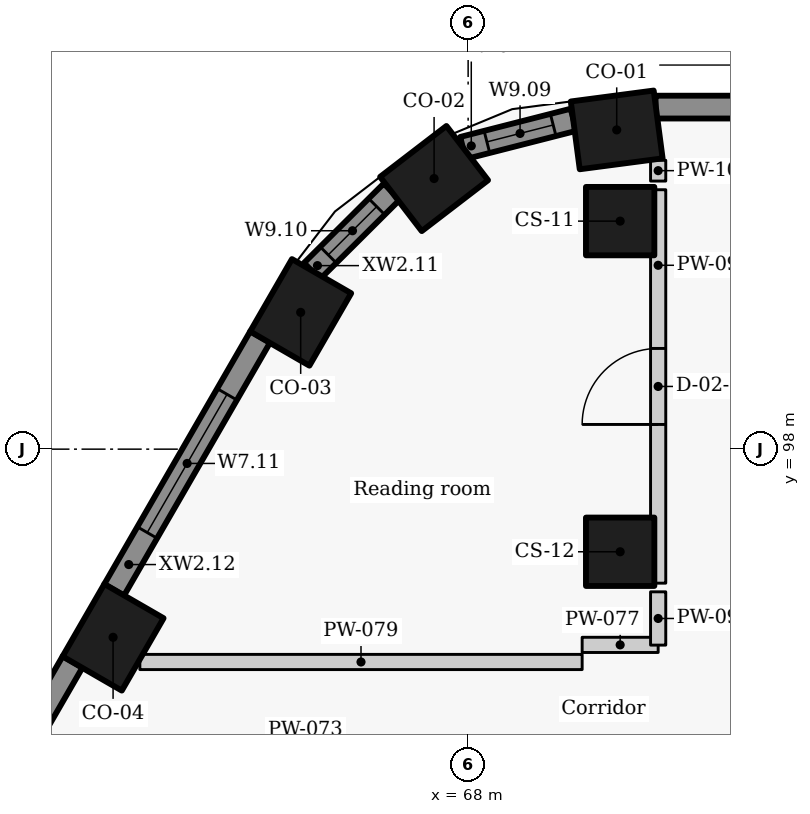
"""IFC4 building model, lengths in metres.
Left out: names, types, materials, properties, quantities, classifications, styles, units other than length and angle.
Written with IfcOpenShell. Run it as: python <this file> out.ifc"""

import sys

from ifc_helpers import new_model, si_unit, direction, frame, frame_2d, origin, origin_2d, place, context, subcontext, project, spatial, rectangle, extrude, element, fill, save


model = new_model("IFC4")
c1 = context("Model", 3, precision=1e-05, world=origin(), true_north=direction((0.0, 1.0)))
c2 = subcontext(c1, "Body", "Model", "MODEL_VIEW")
j1 = project(units=[si_unit("LENGTHUNIT", "METRE"), si_unit("PLANEANGLEUNIT", "RADIAN")], contexts=[c1])
p1 = place(None, origin())
s1 = spatial("IfcSite", under=j1, at=p1, CompositionType="ELEMENT")
p2 = place(p1, origin())
s2 = spatial("IfcBuilding", under=s1, at=p2, CompositionType="ELEMENT")
p3 = place(p2, frame((0.0, 0.0, 239.4)))
s3 = spatial("IfcBuildingStorey", under=s2, at=p3, CompositionType="ELEMENT", Elevation=239.4)
for number, where, z_axis, x_axis in (
    (1, (69.955, 102.2, 0.0), (0.0, 0.0, 1.0), (-0.991, -0.131, 0.0)),
    (2, (67.552, 101.56, 0.0), (0.0, 0.0, 1.0), (-0.793, -0.609, 0.0)),
    (3, (65.797, 99.8, 0.0), (0.0, 0.0, 1.0), (-0.5, -0.866, 0.0)),
    (4, (63.329, 95.525, 0.0), (0.0, 0.0, 1.0), (-0.5, -0.866, 0.0)),
):
    element("IfcColumn", number, at=place(p3, frame(where, z_axis=z_axis, x_axis=x_axis)), inside=s3, PredefinedType="COLUMN", context=c2, shape_type="SweptSolid", body=[
        extrude(rectangle(XDim=1.1, YDim=0.9, at=origin_2d()), origin(), (0.0, 0.0, 1.0), 3.3),
    ])
for number, where, z_axis, x_axis in (
    (5, (70.0, 101.0, 0.0), (0.0, 0.0, 1.0), (0.0, -1.0, 0.0)),
    (6, (70.0, 96.65, 0.0), (0.0, 0.0, 1.0), (0.0, -1.0, 0.0)),
):
    element("IfcColumn", number, at=place(p3, frame(where, z_axis=z_axis, x_axis=x_axis)), inside=s3, PredefinedType="COLUMN", context=c2, shape_type="SweptSolid", body=[
        extrude(rectangle(XDim=0.9, YDim=0.9, at=origin_2d()), origin(), (0.0, 0.0, 1.0), 3.3),
    ])
p4 = place(p3, frame((89.499, 102.5, 0.0), z_axis=(0.0, 0.0, 1.0), x_axis=(-1.0, 0.0, 0.0)))
e7 = element("IfcWall", 7, at=p4, inside=s3, PredefinedType="SOLIDWALL", context=c2, shape_type="SweptSolid", body=[
    extrude(rectangle(XDim=19.033, YDim=0.3, at=frame_2d((9.517, 0.0))), origin(), (0.0, 0.0, 1.0), 2.425),
])
p5 = place(p3, frame((69.386, 102.333, 0.0), z_axis=(0.0, 0.0, 1.0), x_axis=(-0.968895303033, -0.247470991757, 0.0)))
e8 = element("IfcWall", 8, at=p5, inside=s3, PredefinedType="SOLIDWALL", context=c2, shape_type="SweptSolid", body=[
    extrude(rectangle(XDim=1.5, YDim=0.3, at=frame_2d((0.75, 0.0))), origin(), (0.0, 0.0, 1.0), 2.425),
])
p6 = place(p5, frame((0.276, 0.0, 0.9)))
e9 = element("IfcOpeningElement", 9, at=p6, cuts=e8, PredefinedType="OPENING", context=c2, shape_type="SweptSolid", body=[
    extrude(rectangle(XDim=0.9, YDim=1.1, at=frame_2d((0.45, 0.55))), frame((0.0, 0.16, 0.0), z_axis=(0.0, -1.0, 0.0), x_axis=(1.0, 0.0, 0.0)), (0.0, 0.0, 1.0), 0.32),
])
p7 = place(p3, frame((66.996, 101.388, 0.0), z_axis=(0.0, 0.0, 1.0), x_axis=(-0.708589353117, -0.705621094249, 0.0)))
e10 = element("IfcWall", 10, at=p7, inside=s3, PredefinedType="SOLIDWALL", context=c2, shape_type="SweptSolid", body=[
    extrude(rectangle(XDim=1.48, YDim=0.3, at=frame_2d((0.74, 0.0))), origin(), (0.0, 0.0, 1.0), 2.425),
])
p8 = place(p7, frame((0.28, 0.0, 0.9)))
e11 = element("IfcOpeningElement", 11, at=p8, cuts=e10, PredefinedType="OPENING", context=c2, shape_type="SweptSolid", body=[
    extrude(rectangle(XDim=0.9, YDim=1.1, at=frame_2d((0.45, 0.55))), frame((0.0, 0.16, 0.0), z_axis=(0.0, -1.0, 0.0), x_axis=(1.0, 0.0, 0.0)), (0.0, 0.0, 1.0), 0.32),
])
p9 = place(p3, frame((65.264, 99.477, 0.0), z_axis=(0.0, 0.0, 1.0), x_axis=(-0.499984490703, -0.866034357896, 0.0)))
e12 = element("IfcWall", 12, at=p9, inside=s3, PredefinedType="SOLIDWALL", context=c2, shape_type="SweptSolid", body=[
    extrude(rectangle(XDim=3.844, YDim=0.3, at=frame_2d((1.922, 0.0))), origin(), (0.0, 0.0, 1.0), 2.425),
])
p10 = place(p9, frame((0.872, 0.0, 0.9)))
e13 = element("IfcOpeningElement", 13, at=p10, cuts=e12, PredefinedType="OPENING", context=c2, shape_type="SweptSolid", body=[
    extrude(rectangle(XDim=2.1, YDim=1.1, at=frame_2d((1.05, 0.55))), frame((0.0, 0.16, 0.0), z_axis=(0.0, -1.0, 0.0), x_axis=(1.0, 0.0, 0.0)), (0.0, 0.0, 1.0), 0.32),
])
p11 = place(p3, frame((62.796, 95.202, 0.0), z_axis=(0.0, 0.0, 1.0), x_axis=(-0.499984490703, -0.866034357896, 0.0)))
e14 = element("IfcWall", 14, at=p11, inside=s3, PredefinedType="SOLIDWALL", context=c2, shape_type="SweptSolid", body=[
    extrude(rectangle(XDim=3.844, YDim=0.3, at=frame_2d((1.922, 0.0))), origin(), (0.0, 0.0, 1.0), 2.425),
])
p12 = place(p11, frame((1.863, 0.0, 0.9)))
e15 = element("IfcOpeningElement", 15, at=p12, cuts=e14, PredefinedType="OPENING", context=c2, shape_type="SweptSolid", body=[
    extrude(rectangle(XDim=1.5, YDim=1.1, at=frame_2d((0.75, 0.55))), frame((0.0, 0.16, 0.0), z_axis=(0.0, -1.0, 0.0), x_axis=(1.0, 0.0, 0.0)), (0.0, 0.0, 1.0), 0.32),
])
p13 = place(p3, frame((69.5, 95.425, 0.0), z_axis=(0.0, 0.0, 1.0), x_axis=(1.0, 0.0, 0.0)))
e16 = element("IfcWall", 16, at=p13, inside=s3, PredefinedType="PARTITIONING", context=c2, shape_type="SweptSolid", body=[
    extrude(rectangle(XDim=1.0, YDim=0.2, at=frame_2d((0.5, 0.0))), origin(), (0.0, 0.0, 1.0), 2.505),
])
p14 = place(p3, frame((63.681, 95.2, 0.0), z_axis=(0.0, 0.0, 1.0), x_axis=(1.0, 0.0, 0.0)))
e17 = element("IfcWall", 17, at=p14, inside=s3, PredefinedType="PARTITIONING", context=c2, shape_type="SweptSolid", body=[
    extrude(rectangle(XDim=5.819, YDim=0.2, at=frame_2d((2.909, 0.0))), origin(), (0.0, 0.0, 1.0), 3.025),
])
p15 = place(p3, frame((70.5, 95.422, 0.0), z_axis=(0.0, 0.0, 1.0), x_axis=(0.0, 1.0, 0.0)))
e18 = element("IfcWall", 18, at=p15, inside=s3, PredefinedType="PARTITIONING", context=c2, shape_type="SweptSolid", body=[
    extrude(rectangle(XDim=0.701, YDim=0.2, at=frame_2d((0.351, 0.0))), origin(), (0.0, 0.0, 1.0), 3.025),
])
p16 = place(p3, frame((70.5, 96.237, 0.0), z_axis=(0.0, 0.0, 1.0), x_axis=(0.0, 1.0, 0.0)))
e19 = element("IfcWall", 19, at=p16, inside=s3, PredefinedType="PARTITIONING", context=c2, shape_type="SweptSolid", body=[
    extrude(rectangle(XDim=5.176, YDim=0.2, at=frame_2d((2.588, 0.0))), origin(), (0.0, 0.0, 1.0), 3.025),
])
p17 = place(p16, frame((2.088, 0.0, 0.0)))
e20 = element("IfcOpeningElement", 20, at=p17, cuts=e19, PredefinedType="OPENING", context=c2, shape_type="SweptSolid", body=[
    extrude(rectangle(XDim=1.0, YDim=2.1, at=frame_2d((0.5, 1.05))), frame((0.0, 0.11, 0.0), z_axis=(0.0, -1.0, 0.0), x_axis=(1.0, 0.0, 0.0)), (0.0, 0.0, 1.0), 0.22),
])
p18 = place(p3, frame((70.5, 101.527, 0.0), z_axis=(0.0, 0.0, 1.0), x_axis=(0.0, 1.0, 0.0)))
e21 = element("IfcWall", 21, at=p18, inside=s3, PredefinedType="PARTITIONING", context=c2, shape_type="SweptSolid", body=[
    extrude(rectangle(XDim=0.274, YDim=0.2, at=frame_2d((0.137, 0.0))), origin(), (0.0, 0.0, 1.0), 3.025),
])
p19 = place(p6, origin())
e22 = element("IfcWindow", 22, at=p19, inside=s3, PartitioningType="SINGLE_PANEL", PredefinedType="WINDOW", context=c2, shape_type="SweptSolid", body=[
    extrude(rectangle(XDim=0.9, YDim=1.1, at=frame_2d((0.45, 0.55))), frame((0.0, 0.03, 0.0), z_axis=(0.0, -1.0, 0.0), x_axis=(1.0, 0.0, 0.0)), (0.0, 0.0, 1.0), 0.06),
])
fill(e9, e22)
p20 = place(p8, origin())
e23 = element("IfcWindow", 23, at=p20, inside=s3, PartitioningType="SINGLE_PANEL", PredefinedType="WINDOW", context=c2, shape_type="SweptSolid", body=[
    extrude(rectangle(XDim=0.9, YDim=1.1, at=frame_2d((0.45, 0.55))), frame((0.0, 0.03, 0.0), z_axis=(0.0, -1.0, 0.0), x_axis=(1.0, 0.0, 0.0)), (0.0, 0.0, 1.0), 0.06),
])
fill(e11, e23)
p21 = place(p10, origin())
e24 = element("IfcWindow", 24, at=p21, inside=s3, PartitioningType="SINGLE_PANEL", PredefinedType="WINDOW", context=c2, shape_type="SweptSolid", body=[
    extrude(rectangle(XDim=2.1, YDim=1.1, at=frame_2d((1.05, 0.55))), frame((0.0, 0.03, 0.0), z_axis=(0.0, -1.0, 0.0), x_axis=(1.0, 0.0, 0.0)), (0.0, 0.0, 1.0), 0.06),
])
fill(e13, e24)
p22 = place(p17, origin())
e25 = element("IfcDoor", 25, at=p22, inside=s3, OperationType="SINGLE_SWING_LEFT", PredefinedType="DOOR", context=c2, shape_type="SweptSolid", body=[
    extrude(rectangle(XDim=1.0, YDim=2.1, at=frame_2d((0.5, 1.05))), frame((0.0, 0.025, 0.0), z_axis=(0.0, -1.0, 0.0), x_axis=(1.0, 0.0, 0.0)), (0.0, 0.0, 1.0), 0.05),
])
fill(e20, e25)
save(model, sys.argv[1])
